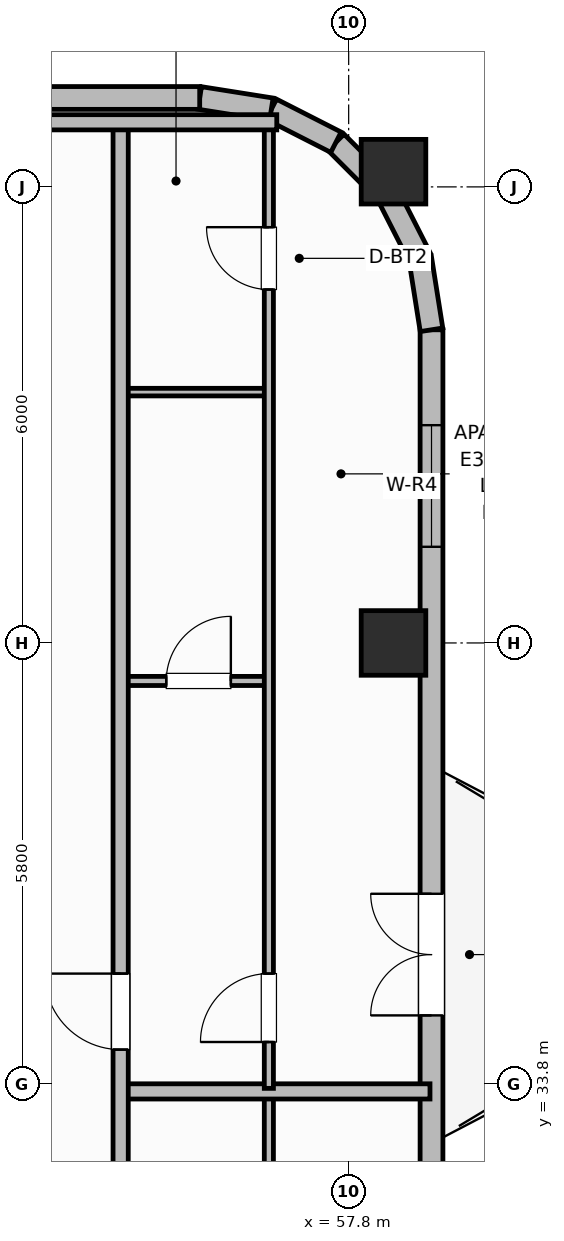
"""IFC4 building model, lengths in metres.
Left out: names, types, materials, properties, quantities, classifications, styles, units other than length and angle.
Written with IfcOpenShell. Run it as: python <this file> out.ifc"""

import sys

from ifc_helpers import new_model, si_unit, direction, frame, frame_2d, origin, origin_2d, place, context, subcontext, project, spatial, rectangle, extrude, element, fill, save


model = new_model("IFC4")
c1 = context("Model", 3, precision=1e-05, world=origin(), true_north=direction((0.0, 1.0)))
c2 = subcontext(c1, "Body", "Model", "MODEL_VIEW")
j1 = project(units=[si_unit("LENGTHUNIT", "METRE"), si_unit("PLANEANGLEUNIT", "RADIAN")], contexts=[c1])
p1 = place(None, origin())
s1 = spatial("IfcSite", under=j1, at=p1, CompositionType="ELEMENT")
p2 = place(p1, origin())
s2 = spatial("IfcBuilding", under=s1, at=p2, CompositionType="ELEMENT")
p3 = place(p2, frame((0.0, 0.0, 236.9)))
s3 = spatial("IfcBuildingStorey", under=s2, at=p3, CompositionType="ELEMENT", Elevation=236.9)
for number, where, z_axis, x_axis in (
    (1, (58.39, 39.6, 0.0), (0.0, 0.0, 1.0), (1.0, 0.0, 0.0)),
    (2, (58.39, 45.8, 0.0), (0.0, 0.0, 1.0), (1.0, 0.0, 0.0)),
):
    element("IfcColumn", number, at=place(p3, frame(where, z_axis=z_axis, x_axis=x_axis)), inside=s3, PredefinedType="COLUMN", context=c2, shape_type="SweptSolid", body=[
        extrude(rectangle(XDim=0.85, YDim=0.85, at=origin_2d()), origin(), (0.0, 0.0, 1.0), 3.7),
    ])
p4 = place(p3, frame((58.89, 32.6, 0.0), z_axis=(0.0, 0.0, 1.0), x_axis=(0.0, 1.0, 0.0)))
e3 = element("IfcWall", 3, at=p4, inside=s3, PredefinedType="SOLIDWALL", context=c2, shape_type="SweptSolid", body=[
    extrude(rectangle(XDim=11.12, YDim=0.3, at=frame_2d((5.56, 0.0))), origin(), (0.0, 0.0, 1.0), 2.73),
])
p5 = place(p4, frame((2.1, 0.0, 0.0)))
e4 = element("IfcOpeningElement", 4, at=p5, cuts=e3, PredefinedType="OPENING", context=c2, shape_type="SweptSolid", body=[
    extrude(rectangle(XDim=1.6, YDim=2.1, at=frame_2d((0.8, 1.05))), frame((0.0, 0.16, 0.0), z_axis=(0.0, -1.0, 0.0), x_axis=(1.0, 0.0, 0.0)), (0.0, 0.0, 1.0), 0.32),
])
p6 = place(p4, frame((8.265, 0.0, 0.71)))
e5 = element("IfcOpeningElement", 5, at=p6, cuts=e3, PredefinedType="OPENING", context=c2, shape_type="SweptSolid", body=[
    extrude(rectangle(XDim=1.6, YDim=1.9, at=frame_2d((0.8, 0.95))), frame((0.0, 0.16, 0.0), z_axis=(0.0, -1.0, 0.0), x_axis=(1.0, 0.0, 0.0)), (0.0, 0.0, 1.0), 0.32),
])
p7 = place(p3, frame((58.89, 43.72, 0.0), z_axis=(0.0, 0.0, 1.0), x_axis=(-0.156304114255, 0.987708977314, 0.0)))
e6 = element("IfcWall", 6, at=p7, inside=s3, PredefinedType="SOLIDWALL", context=c2, shape_type="SweptSolid", body=[
    extrude(rectangle(XDim=0.954, YDim=0.3, at=frame_2d((0.477, 0.0))), origin(), (0.0, 0.0, 1.0), 2.73),
])
p8 = place(p3, frame((58.741, 44.663, 0.0), z_axis=(0.0, 0.0, 1.0), x_axis=(-0.45395644796, 0.891023873617, 0.0)))
e7 = element("IfcWall", 7, at=p8, inside=s3, PredefinedType="SOLIDWALL", context=c2, shape_type="SweptSolid", body=[
    extrude(rectangle(XDim=0.954, YDim=0.3, at=frame_2d((0.477, 0.0))), origin(), (0.0, 0.0, 1.0), 2.73),
])
for number, where, z_axis, x_axis in (
    (8, (58.308, 45.513, 0.0), (0.0, 0.0, 1.0), (-0.707, 0.707, 0.0)),
    (9, (57.633, 46.188, 0.0), (0.0, 0.0, 1.0), (-0.891, 0.454, 0.0)),
):
    element("IfcWall", number, at=place(p3, frame(where, z_axis=z_axis, x_axis=x_axis)), inside=s3, PredefinedType="SOLIDWALL", context=c2, shape_type="SweptSolid", body=[
        extrude(rectangle(XDim=0.954, YDim=0.3, at=frame_2d((0.477, 0.0))), origin(), (0.0, 0.0, 1.0), 2.73),
    ])
p9 = place(p3, frame((56.782, 46.621, 0.0), z_axis=(0.0, 0.0, 1.0), x_axis=(-0.987663181641, 0.156593229835, 0.0)))
e10 = element("IfcWall", 10, at=p9, inside=s3, PredefinedType="SOLIDWALL", context=c2, shape_type="SweptSolid", body=[
    extrude(rectangle(XDim=0.954, YDim=0.3, at=frame_2d((0.477, 0.0))), origin(), (0.0, 0.0, 1.0), 2.73),
])
p10 = place(p3, frame((55.84, 46.77, 0.0), z_axis=(0.0, 0.0, 1.0), x_axis=(-1.0, 0.0, 0.0)))
e11 = element("IfcWall", 11, at=p10, inside=s3, PredefinedType="SOLIDWALL", context=c2, shape_type="SweptSolid", body=[
    extrude(rectangle(XDim=4.45, YDim=0.3, at=frame_2d((2.225, 0.0))), origin(), (0.0, 0.0, 1.0), 2.73),
])
p11 = place(p3, frame((56.75, 22.4, 0.0), z_axis=(0.0, 0.0, 1.0), x_axis=(0.0, 1.0, 0.0)))
e12 = element("IfcWall", 12, at=p11, inside=s3, PredefinedType="PARTITIONING", context=c2, shape_type="SweptSolid", body=[
    extrude(rectangle(XDim=11.26, YDim=0.12, at=frame_2d((5.63, 0.0))), origin(), (0.0, 0.0, 1.0), 2.56),
])
p12 = place(p11, frame((0.61, 0.0, 0.0)))
e13 = element("IfcOpeningElement", 13, at=p12, cuts=e12, PredefinedType="OPENING", context=c2, shape_type="SweptSolid", body=[
    extrude(rectangle(XDim=0.9, YDim=2.1, at=frame_2d((0.45, 1.05))), frame((0.0, 0.07, 0.0), z_axis=(0.0, -1.0, 0.0), x_axis=(1.0, 0.0, 0.0)), (0.0, 0.0, 1.0), 0.14),
])
p13 = place(p3, frame((54.8, 33.7, 0.0), z_axis=(0.0, 0.0, 1.0), x_axis=(1.0, 0.0, 0.0)))
e14 = element("IfcWall", 14, at=p13, inside=s3, PredefinedType="PARTITIONING", context=c2, shape_type="SweptSolid", body=[
    extrude(rectangle(XDim=4.07, YDim=0.2, at=frame_2d((2.035, 0.0))), origin(), (0.0, 0.0, 1.0), 2.56),
])
p14 = place(p3, frame((54.8, 39.1, 0.0), z_axis=(0.0, 0.0, 1.0), x_axis=(1.0, 0.0, 0.0)))
e15 = element("IfcWall", 15, at=p14, inside=s3, PredefinedType="PARTITIONING", context=c2, shape_type="SweptSolid", body=[
    extrude(rectangle(XDim=1.95, YDim=0.12, at=frame_2d((0.975, 0.0))), origin(), (0.0, 0.0, 1.0), 2.56),
])
p15 = place(p14, frame((0.6, 0.0, 0.0)))
e16 = element("IfcOpeningElement", 16, at=p15, cuts=e15, PredefinedType="OPENING", context=c2, shape_type="SweptSolid", body=[
    extrude(rectangle(XDim=0.85, YDim=2.1, at=frame_2d((0.425, 1.05))), frame((0.0, 0.07, 0.0), z_axis=(0.0, -1.0, 0.0), x_axis=(1.0, 0.0, 0.0)), (0.0, 0.0, 1.0), 0.14),
])
p16 = place(p3, frame((54.8, 42.9, 0.0), z_axis=(0.0, 0.0, 1.0), x_axis=(1.0, 0.0, 0.0)))
e17 = element("IfcWall", 17, at=p16, inside=s3, PredefinedType="PARTITIONING", context=c2, shape_type="SweptSolid", body=[
    extrude(rectangle(XDim=1.95, YDim=0.1, at=frame_2d((0.975, 0.0))), origin(), (0.0, 0.0, 1.0), 2.56),
])
p17 = place(p3, frame((56.75, 33.74, 0.0), z_axis=(0.0, 0.0, 1.0), x_axis=(0.0, 1.0, 0.0)))
e18 = element("IfcWall", 18, at=p17, inside=s3, PredefinedType="PARTITIONING", context=c2, shape_type="SweptSolid", body=[
    extrude(rectangle(XDim=12.67, YDim=0.12, at=frame_2d((6.335, 0.0))), origin(), (0.0, 0.0, 1.0), 2.56),
])
p18 = place(p17, frame((0.61, 0.0, 0.0)))
e19 = element("IfcOpeningElement", 19, at=p18, cuts=e18, PredefinedType="OPENING", context=c2, shape_type="SweptSolid", body=[
    extrude(rectangle(XDim=0.9, YDim=2.1, at=frame_2d((0.45, 1.05))), frame((0.0, 0.07, 0.0), z_axis=(0.0, -1.0, 0.0), x_axis=(1.0, 0.0, 0.0)), (0.0, 0.0, 1.0), 0.14),
])
p19 = place(p17, frame((10.51, 0.0, 0.0)))
e20 = element("IfcOpeningElement", 20, at=p19, cuts=e18, PredefinedType="OPENING", context=c2, shape_type="SweptSolid", body=[
    extrude(rectangle(XDim=0.82, YDim=2.08, at=frame_2d((0.41, 1.04))), frame((0.0, 0.07, 0.0), z_axis=(0.0, -1.0, 0.0), x_axis=(1.0, 0.0, 0.0)), (0.0, 0.0, 1.0), 0.14),
])
p20 = place(p3, frame((54.8, 9.95, 0.0), z_axis=(0.0, 0.0, 1.0), x_axis=(0.0, 1.0, 0.0)))
e21 = element("IfcWall", 21, at=p20, inside=s3, PredefinedType="PARTITIONING", context=c2, shape_type="SweptSolid", body=[
    extrude(rectangle(XDim=36.5, YDim=0.2, at=frame_2d((18.25, 0.0))), origin(), (0.0, 0.0, 1.0), 2.56),
])
p21 = place(p20, frame((3.25, 0.0, 0.0)))
e22 = element("IfcOpeningElement", 22, at=p21, cuts=e21, PredefinedType="OPENING", context=c2, shape_type="SweptSolid", body=[
    extrude(rectangle(XDim=1.0, YDim=2.15, at=frame_2d((0.5, 1.075))), frame((0.0, 0.11, 0.0), z_axis=(0.0, -1.0, 0.0), x_axis=(1.0, 0.0, 0.0)), (0.0, 0.0, 1.0), 0.22),
])
p22 = place(p20, frame((12.96, 0.0, 0.0)))
e23 = element("IfcOpeningElement", 23, at=p22, cuts=e21, PredefinedType="OPENING", context=c2, shape_type="SweptSolid", body=[
    extrude(rectangle(XDim=1.0, YDim=2.15, at=frame_2d((0.5, 1.075))), frame((0.0, 0.11, 0.0), z_axis=(0.0, -1.0, 0.0), x_axis=(1.0, 0.0, 0.0)), (0.0, 0.0, 1.0), 0.22),
])
p23 = place(p20, frame((24.3, 0.0, 0.0)))
e24 = element("IfcOpeningElement", 24, at=p23, cuts=e21, PredefinedType="OPENING", context=c2, shape_type="SweptSolid", body=[
    extrude(rectangle(XDim=1.0, YDim=2.15, at=frame_2d((0.5, 1.075))), frame((0.0, 0.11, 0.0), z_axis=(0.0, -1.0, 0.0), x_axis=(1.0, 0.0, 0.0)), (0.0, 0.0, 1.0), 0.22),
])
p24 = place(p3, frame((53.1, 46.45, 0.0), z_axis=(0.0, 0.0, 1.0), x_axis=(1.0, 0.0, 0.0)))
e25 = element("IfcWall", 25, at=p24, inside=s3, PredefinedType="PARTITIONING", context=c2, shape_type="SweptSolid", body=[
    extrude(rectangle(XDim=3.754, YDim=0.2, at=frame_2d((1.877, 0.0))), origin(), (0.0, 0.0, 1.0), 2.56),
])
p25 = place(p5, origin())
e26 = element("IfcDoor", 26, at=p25, inside=s3, OperationType="DOUBLE_DOOR_SINGLE_SWING", PredefinedType="DOOR", context=c2, shape_type="SweptSolid", body=[
    extrude(rectangle(XDim=1.6, YDim=2.1, at=frame_2d((0.8, 1.05))), frame((0.0, 0.025, 0.0), z_axis=(0.0, -1.0, 0.0), x_axis=(1.0, 0.0, 0.0)), (0.0, 0.0, 1.0), 0.05),
])
fill(e4, e26)
p26 = place(p6, origin())
e27 = element("IfcWindow", 27, at=p26, inside=s3, PartitioningType="SINGLE_PANEL", PredefinedType="WINDOW", context=c2, shape_type="SweptSolid", body=[
    extrude(rectangle(XDim=1.6, YDim=1.9, at=frame_2d((0.8, 0.95))), frame((0.0, 0.03, 0.0), z_axis=(0.0, -1.0, 0.0), x_axis=(1.0, 0.0, 0.0)), (0.0, 0.0, 1.0), 0.06),
])
fill(e5, e27)
p27 = place(p15, origin())
e28 = element("IfcDoor", 28, at=p27, inside=s3, OperationType="SINGLE_SWING_RIGHT", PredefinedType="DOOR", context=c2, shape_type="SweptSolid", body=[
    extrude(rectangle(XDim=0.85, YDim=2.1, at=frame_2d((0.425, 1.05))), frame((0.0, 0.025, 0.0), z_axis=(0.0, -1.0, 0.0), x_axis=(1.0, 0.0, 0.0)), (0.0, 0.0, 1.0), 0.05),
])
fill(e16, e28)
p28 = place(p18, origin())
e29 = element("IfcDoor", 29, at=p28, inside=s3, OperationType="SINGLE_SWING_LEFT", PredefinedType="DOOR", context=c2, shape_type="SweptSolid", body=[
    extrude(rectangle(XDim=0.9, YDim=2.1, at=frame_2d((0.45, 1.05))), frame((0.0, 0.025, 0.0), z_axis=(0.0, -1.0, 0.0), x_axis=(1.0, 0.0, 0.0)), (0.0, 0.0, 1.0), 0.05),
])
fill(e19, e29)
p29 = place(p19, origin())
e30 = element("IfcDoor", 30, at=p29, inside=s3, OperationType="SINGLE_SWING_RIGHT", PredefinedType="DOOR", context=c2, shape_type="SweptSolid", body=[
    extrude(rectangle(XDim=0.82, YDim=2.08, at=frame_2d((0.41, 1.04))), frame((0.0, 0.025, 0.0), z_axis=(0.0, -1.0, 0.0), x_axis=(1.0, 0.0, 0.0)), (0.0, 0.0, 1.0), 0.05),
])
fill(e20, e30)
p30 = place(p23, origin())
e31 = element("IfcDoor", 31, at=p30, inside=s3, OperationType="SINGLE_SWING_RIGHT", PredefinedType="DOOR", context=c2, shape_type="SweptSolid", body=[
    extrude(rectangle(XDim=1.0, YDim=2.15, at=frame_2d((0.5, 1.075))), frame((0.0, 0.025, 0.0), z_axis=(0.0, -1.0, 0.0), x_axis=(1.0, 0.0, 0.0)), (0.0, 0.0, 1.0), 0.05),
])
fill(e24, e31)
save(model, sys.argv[1])
